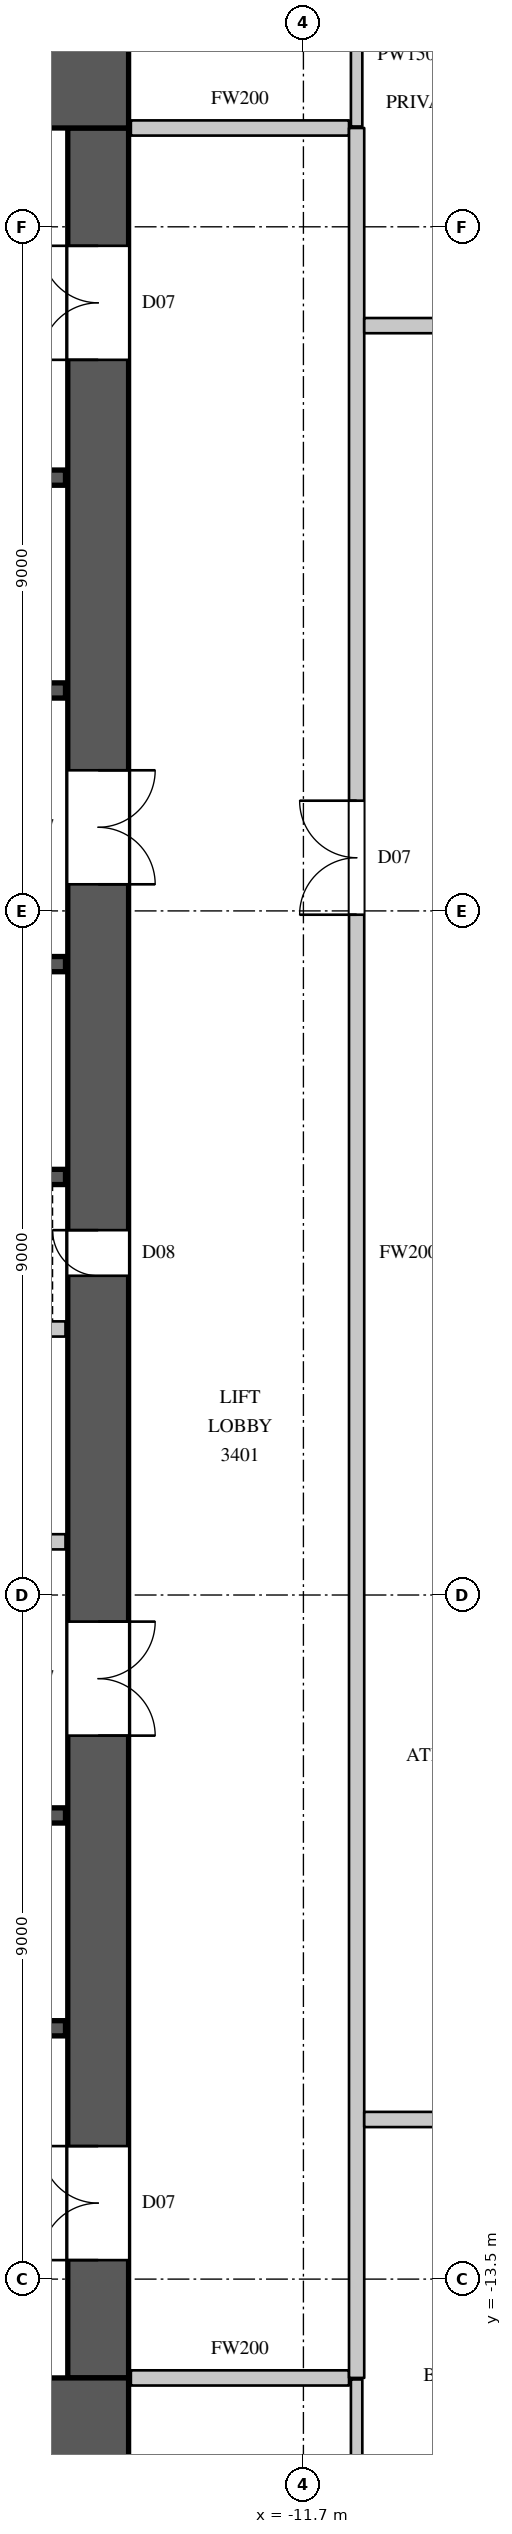
"""IFC4 building model, lengths in metres.
Left out: names, types, materials, properties, quantities, classifications, styles, units other than length and angle.
Written with IfcOpenShell. Run it as: python <this file> out.ifc"""

import sys

from ifc_helpers import new_model, si_unit, direction, frame, frame_2d, origin, place, context, subcontext, project, spatial, rectangle, extrude, element, fill, save


model = new_model("IFC4")
c1 = context("Model", 3, precision=1e-05, world=origin(), true_north=direction((0.0, 1.0)))
c2 = subcontext(c1, "Body", "Model", "MODEL_VIEW")
j1 = project(units=[si_unit("LENGTHUNIT", "METRE"), si_unit("PLANEANGLEUNIT", "RADIAN")], contexts=[c1])
p1 = place(None, origin())
s1 = spatial("IfcSite", under=j1, at=p1, CompositionType="ELEMENT")
p2 = place(p1, origin())
s2 = spatial("IfcBuilding", under=s1, at=p2, CompositionType="ELEMENT")
p3 = place(p2, frame((0.0, 0.0, 160.5)))
s3 = spatial("IfcBuildingStorey", under=s2, at=p3, CompositionType="ELEMENT", Elevation=160.5)
for number, where, z_axis, x_axis in (
    (1, (-30.0, 15.4, 0.0), (0.0, 0.0, 1.0), (1.0, 0.0, 0.0)),
    (2, (-30.0, -15.4, 0.0), (0.0, 0.0, 1.0), (1.0, 0.0, 0.0)),
):
    element("IfcWall", number, at=place(p3, frame(where, z_axis=z_axis, x_axis=x_axis)), inside=s3, PredefinedType="SHEAR", context=c2, shape_type="SweptSolid", body=[
        extrude(rectangle(XDim=16.0, YDim=1.2, at=frame_2d((8.0, 0.0))), origin(), (0.0, 0.0, 1.0), 4.1),
    ])
p4 = place(p3, frame((-14.4, -14.8, 0.0), z_axis=(0.0, 0.0, 1.0), x_axis=(0.0, 1.0, 0.0)))
e3 = element("IfcWall", 3, at=p4, inside=s3, PredefinedType="SHEAR", context=c2, shape_type="SweptSolid", body=[
    extrude(rectangle(XDim=29.6, YDim=0.8, at=frame_2d((14.8, 0.0))), origin(), (0.0, 0.0, 1.0), 4.1),
])
p5 = place(p4, frame((1.55, 0.0, 0.0)))
e4 = element("IfcOpeningElement", 4, at=p5, cuts=e3, PredefinedType="OPENING", context=c2, shape_type="SweptSolid", body=[
    extrude(rectangle(XDim=1.5, YDim=2.4, at=frame_2d((0.75, 1.2))), frame((0.0, 0.41, 0.0), z_axis=(0.0, -1.0, 0.0), x_axis=(1.0, 0.0, 0.0)), (0.0, 0.0, 1.0), 0.82),
])
p6 = place(p4, frame((26.55, 0.0, 0.0)))
e5 = element("IfcOpeningElement", 5, at=p6, cuts=e3, PredefinedType="OPENING", context=c2, shape_type="SweptSolid", body=[
    extrude(rectangle(XDim=1.5, YDim=2.4, at=frame_2d((0.75, 1.2))), frame((0.0, 0.41, 0.0), z_axis=(0.0, -1.0, 0.0), x_axis=(1.0, 0.0, 0.0)), (0.0, 0.0, 1.0), 0.82),
])
p7 = place(p4, frame((8.45, 0.0, 0.0)))
e6 = element("IfcOpeningElement", 6, at=p7, cuts=e3, PredefinedType="OPENING", context=c2, shape_type="SweptSolid", body=[
    extrude(rectangle(XDim=1.5, YDim=2.4, at=frame_2d((0.75, 1.2))), frame((0.0, 0.41, 0.0), z_axis=(0.0, -1.0, 0.0), x_axis=(1.0, 0.0, 0.0)), (0.0, 0.0, 1.0), 0.82),
])
p8 = place(p4, frame((19.65, 0.0, 0.0)))
e7 = element("IfcOpeningElement", 7, at=p8, cuts=e3, PredefinedType="OPENING", context=c2, shape_type="SweptSolid", body=[
    extrude(rectangle(XDim=1.5, YDim=2.4, at=frame_2d((0.75, 1.2))), frame((0.0, 0.41, 0.0), z_axis=(0.0, -1.0, 0.0), x_axis=(1.0, 0.0, 0.0)), (0.0, 0.0, 1.0), 0.82),
])
p9 = place(p4, frame((14.5, 0.0, 0.0)))
e8 = element("IfcOpeningElement", 8, at=p9, cuts=e3, PredefinedType="OPENING", context=c2, shape_type="SweptSolid", body=[
    extrude(rectangle(XDim=0.6, YDim=2.0, at=frame_2d((0.3, 1.0))), frame((0.0, 0.41, 0.0), z_axis=(0.0, -1.0, 0.0), x_axis=(1.0, 0.0, 0.0)), (0.0, 0.0, 1.0), 0.82),
])
p10 = place(p3, frame((-22.62, -3.8, 0.0), z_axis=(0.0, 0.0, 1.0), x_axis=(1.0, 0.0, 0.0)))
e9 = element("IfcWall", 9, at=p10, inside=s3, PredefinedType="PARTITIONING", context=c2, shape_type="SweptSolid", body=[
    extrude(rectangle(XDim=7.79, YDim=0.2, at=frame_2d((3.895, 0.0))), origin(), (0.0, 0.0, 1.0), 3.8),
])
p11 = place(p10, frame((3.45, 0.0, 0.0)))
e10 = element("IfcOpeningElement", 10, at=p11, cuts=e9, PredefinedType="OPENING", context=c2, shape_type="SweptSolid", body=[
    extrude(rectangle(XDim=0.9, YDim=2.2, at=frame_2d((0.45, 1.1))), frame((0.0, 0.11, 0.0), z_axis=(0.0, -1.0, 0.0), x_axis=(1.0, 0.0, 0.0)), (0.0, 0.0, 1.0), 0.22),
])
for number, where, z_axis, x_axis in (
    (11, (-13.97, -14.8, 0.0), (0.0, 0.0, 1.0), (1.0, 0.0, 0.0)),
    (12, (-13.97, 14.8, 0.0), (0.0, 0.0, 1.0), (1.0, 0.0, 0.0)),
):
    element("IfcWall", number, at=place(p3, frame(where, z_axis=z_axis, x_axis=x_axis)), inside=s3, PredefinedType="PARTITIONING", context=c2, shape_type="SweptSolid", body=[
        extrude(rectangle(XDim=2.87, YDim=0.2, at=frame_2d((1.435, 0.0))), origin(), (0.0, 0.0, 1.0), 3.8),
    ])
p12 = place(p3, frame((-11.0, -14.8, 0.0), z_axis=(0.0, 0.0, 1.0), x_axis=(0.0, 1.0, 0.0)))
e13 = element("IfcWall", 13, at=p12, inside=s3, PredefinedType="PARTITIONING", context=c2, shape_type="SweptSolid", body=[
    extrude(rectangle(XDim=29.6, YDim=0.2, at=frame_2d((14.8, 0.0))), origin(), (0.0, 0.0, 1.0), 3.8),
])
p13 = place(p12, frame((19.25, 0.0, 0.0)))
e14 = element("IfcOpeningElement", 14, at=p13, cuts=e13, PredefinedType="OPENING", context=c2, shape_type="SweptSolid", body=[
    extrude(rectangle(XDim=1.5, YDim=2.4, at=frame_2d((0.75, 1.2))), frame((0.0, 0.11, 0.0), z_axis=(0.0, -1.0, 0.0), x_axis=(1.0, 0.0, 0.0)), (0.0, 0.0, 1.0), 0.22),
])
p14 = place(p3, frame((-10.9, -11.4, 0.0), z_axis=(0.0, 0.0, 1.0), x_axis=(1.0, 0.0, 0.0)))
e15 = element("IfcWall", 15, at=p14, inside=s3, PredefinedType="PARTITIONING", context=c2, shape_type="SweptSolid", body=[
    extrude(rectangle(XDim=21.2, YDim=0.2, at=frame_2d((10.6, 0.0))), origin(), (0.0, 0.0, 1.0), 3.8),
])
p15 = place(p14, frame((0.95, 0.0, 0.0)))
e16 = element("IfcOpeningElement", 16, at=p15, cuts=e15, PredefinedType="OPENING", context=c2, shape_type="SweptSolid", body=[
    extrude(rectangle(XDim=0.95, YDim=2.2, at=frame_2d((0.475, 1.1))), frame((0.0, 0.11, 0.0), z_axis=(0.0, -1.0, 0.0), x_axis=(1.0, 0.0, 0.0)), (0.0, 0.0, 1.0), 0.22),
])
p16 = place(p14, frame((4.2, 0.0, 0.0)))
e17 = element("IfcOpeningElement", 17, at=p16, cuts=e15, PredefinedType="OPENING", context=c2, shape_type="SweptSolid", body=[
    extrude(rectangle(XDim=0.95, YDim=2.2, at=frame_2d((0.475, 1.1))), frame((0.0, 0.11, 0.0), z_axis=(0.0, -1.0, 0.0), x_axis=(1.0, 0.0, 0.0)), (0.0, 0.0, 1.0), 0.22),
])
p17 = place(p14, frame((7.1, 0.0, 0.0)))
e18 = element("IfcOpeningElement", 18, at=p17, cuts=e15, PredefinedType="OPENING", context=c2, shape_type="SweptSolid", body=[
    extrude(rectangle(XDim=0.9, YDim=2.2, at=frame_2d((0.45, 1.1))), frame((0.0, 0.11, 0.0), z_axis=(0.0, -1.0, 0.0), x_axis=(1.0, 0.0, 0.0)), (0.0, 0.0, 1.0), 0.22),
])
p18 = place(p14, frame((10.0, 0.0, 0.0)))
e19 = element("IfcOpeningElement", 19, at=p18, cuts=e15, PredefinedType="OPENING", context=c2, shape_type="SweptSolid", body=[
    extrude(rectangle(XDim=0.9, YDim=2.2, at=frame_2d((0.45, 1.1))), frame((0.0, 0.11, 0.0), z_axis=(0.0, -1.0, 0.0), x_axis=(1.0, 0.0, 0.0)), (0.0, 0.0, 1.0), 0.22),
])
p19 = place(p14, frame((13.55, 0.0, 0.0)))
e20 = element("IfcOpeningElement", 20, at=p19, cuts=e15, PredefinedType="OPENING", context=c2, shape_type="SweptSolid", body=[
    extrude(rectangle(XDim=0.9, YDim=2.2, at=frame_2d((0.45, 1.1))), frame((0.0, 0.11, 0.0), z_axis=(0.0, -1.0, 0.0), x_axis=(1.0, 0.0, 0.0)), (0.0, 0.0, 1.0), 0.22),
])
p20 = place(p14, frame((17.85, 0.0, 0.0)))
e21 = element("IfcOpeningElement", 21, at=p20, cuts=e15, PredefinedType="OPENING", context=c2, shape_type="SweptSolid", body=[
    extrude(rectangle(XDim=1.1, YDim=2.4, at=frame_2d((0.55, 1.2))), frame((0.0, 0.11, 0.0), z_axis=(0.0, -1.0, 0.0), x_axis=(1.0, 0.0, 0.0)), (0.0, 0.0, 1.0), 0.22),
])
p21 = place(p3, frame((-10.9, 12.2, 0.0), z_axis=(0.0, 0.0, 1.0), x_axis=(1.0, 0.0, 0.0)))
e22 = element("IfcWall", 22, at=p21, inside=s3, PredefinedType="PARTITIONING", context=c2, shape_type="SweptSolid", body=[
    extrude(rectangle(XDim=3.704, YDim=0.2, at=frame_2d((1.852, 0.0))), origin(), (0.0, 0.0, 1.0), 3.8),
])
p22 = place(p21, frame((1.7, 0.0, 0.0)))
e23 = element("IfcOpeningElement", 23, at=p22, cuts=e22, PredefinedType="OPENING", context=c2, shape_type="SweptSolid", body=[
    extrude(rectangle(XDim=1.1, YDim=2.4, at=frame_2d((0.55, 1.2))), frame((0.0, 0.11, 0.0), z_axis=(0.0, -1.0, 0.0), x_axis=(1.0, 0.0, 0.0)), (0.0, 0.0, 1.0), 0.22),
])
for number, where, z_axis, x_axis in (
    (24, (-11.0, -16.7, 0.0), (0.0, 0.0, 1.0), (0.0, 1.0, 0.0)),
    (25, (-11.0, 14.82, 0.0), (0.0, 0.0, 1.0), (0.0, 1.0, 0.0)),
):
    element("IfcWall", number, at=place(p3, frame(where, z_axis=z_axis, x_axis=x_axis)), inside=s3, PredefinedType="PARTITIONING", context=c2, shape_type="SweptSolid", body=[
        extrude(rectangle(XDim=1.88, YDim=0.15, at=frame_2d((0.94, 0.0))), origin(), (0.0, 0.0, 1.0), 3.8),
    ])
p23 = place(p3, frame((-29.17, -1.0, 0.0), z_axis=(0.0, 0.0, 1.0), x_axis=(1.0, 0.0, 0.0)))
e26 = element("IfcWall", 26, at=p23, inside=s3, PredefinedType="PARTITIONING", context=c2, shape_type="SweptSolid", body=[
    extrude(rectangle(XDim=14.34, YDim=0.2, at=frame_2d((7.17, 0.0))), origin(), (0.0, 0.0, 1.0), 3.8),
])
p24 = place(p3, frame((-26.08, 1.0, 0.0), z_axis=(0.0, 0.0, 1.0), x_axis=(1.0, 0.0, 0.0)))
e27 = element("IfcWall", 27, at=p24, inside=s3, PredefinedType="SHEAR", context=c2, shape_type="SweptSolid", body=[
    extrude(rectangle(XDim=11.25, YDim=0.2, at=frame_2d((5.625, 0.0))), origin(), (0.0, 0.0, 1.0), 3.8),
])
p25 = place(p3, frame((-26.08, 3.8, 0.0), z_axis=(0.0, 0.0, 1.0), x_axis=(1.0, 0.0, 0.0)))
e28 = element("IfcWall", 28, at=p25, inside=s3, PredefinedType="SHEAR", context=c2, shape_type="SweptSolid", body=[
    extrude(rectangle(XDim=11.25, YDim=0.2, at=frame_2d((5.625, 0.0))), origin(), (0.0, 0.0, 1.0), 3.8),
])
p26 = place(p25, frame((0.8, 0.0, 0.0)))
e29 = element("IfcOpeningElement", 29, at=p26, cuts=e28, PredefinedType="OPENING", context=c2, shape_type="SweptSolid", body=[
    extrude(rectangle(XDim=1.1, YDim=2.2, at=frame_2d((0.55, 1.1))), frame((0.0, 0.11, 0.0), z_axis=(0.0, -1.0, 0.0), x_axis=(1.0, 0.0, 0.0)), (0.0, 0.0, 1.0), 0.22),
])
p27 = place(p25, frame((3.55, 0.0, 0.0)))
e30 = element("IfcOpeningElement", 30, at=p27, cuts=e28, PredefinedType="OPENING", context=c2, shape_type="SweptSolid", body=[
    extrude(rectangle(XDim=1.1, YDim=2.2, at=frame_2d((0.55, 1.1))), frame((0.0, 0.11, 0.0), z_axis=(0.0, -1.0, 0.0), x_axis=(1.0, 0.0, 0.0)), (0.0, 0.0, 1.0), 0.22),
])
p28 = place(p25, frame((6.25, 0.0, 0.0)))
e31 = element("IfcOpeningElement", 31, at=p28, cuts=e28, PredefinedType="OPENING", context=c2, shape_type="SweptSolid", body=[
    extrude(rectangle(XDim=1.1, YDim=2.2, at=frame_2d((0.55, 1.1))), frame((0.0, 0.11, 0.0), z_axis=(0.0, -1.0, 0.0), x_axis=(1.0, 0.0, 0.0)), (0.0, 0.0, 1.0), 0.22),
])
p29 = place(p25, frame((9.15, 0.0, 0.0)))
e32 = element("IfcOpeningElement", 32, at=p29, cuts=e28, PredefinedType="OPENING", context=c2, shape_type="SweptSolid", body=[
    extrude(rectangle(XDim=1.1, YDim=2.2, at=frame_2d((0.55, 1.1))), frame((0.0, 0.11, 0.0), z_axis=(0.0, -1.0, 0.0), x_axis=(1.0, 0.0, 0.0)), (0.0, 0.0, 1.0), 0.22),
])
p30 = place(p3, frame((-17.92, -10.2, 0.0), z_axis=(0.0, 0.0, 1.0), x_axis=(1.0, 0.0, 0.0)))
e33 = element("IfcWall", 33, at=p30, inside=s3, PredefinedType="SHEAR", context=c2, shape_type="SweptSolid", body=[
    extrude(rectangle(XDim=3.09, YDim=0.2, at=frame_2d((1.545, 0.0))), origin(), (0.0, 0.0, 1.0), 3.8),
])
p31 = place(p30, frame((1.0, 0.0, 0.0)))
e34 = element("IfcOpeningElement", 34, at=p31, cuts=e33, PredefinedType="OPENING", context=c2, shape_type="SweptSolid", body=[
    extrude(rectangle(XDim=1.1, YDim=2.2, at=frame_2d((0.55, 1.1))), frame((0.0, 0.11, 0.0), z_axis=(0.0, -1.0, 0.0), x_axis=(1.0, 0.0, 0.0)), (0.0, 0.0, 1.0), 0.22),
])
p32 = place(p3, frame((-17.9, -7.4, 0.0), z_axis=(0.0, 0.0, 1.0), x_axis=(1.0, 0.0, 0.0)))
e35 = element("IfcWall", 35, at=p32, inside=s3, PredefinedType="SHEAR", context=c2, shape_type="SweptSolid", body=[
    extrude(rectangle(XDim=3.07, YDim=0.2, at=frame_2d((1.535, 0.0))), origin(), (0.0, 0.0, 1.0), 3.8),
])
p33 = place(p3, frame((-17.92, 7.4, 0.0), z_axis=(0.0, 0.0, 1.0), x_axis=(1.0, 0.0, 0.0)))
e36 = element("IfcWall", 36, at=p33, inside=s3, PredefinedType="SHEAR", context=c2, shape_type="SweptSolid", body=[
    extrude(rectangle(XDim=3.09, YDim=0.2, at=frame_2d((1.545, 0.0))), origin(), (0.0, 0.0, 1.0), 3.8),
])
p34 = place(p3, frame((-17.92, 10.2, 0.0), z_axis=(0.0, 0.0, 1.0), x_axis=(1.0, 0.0, 0.0)))
e37 = element("IfcWall", 37, at=p34, inside=s3, PredefinedType="SHEAR", context=c2, shape_type="SweptSolid", body=[
    extrude(rectangle(XDim=3.09, YDim=0.2, at=frame_2d((1.545, 0.0))), origin(), (0.0, 0.0, 1.0), 3.8),
])
p35 = place(p34, frame((1.0, 0.0, 0.0)))
e38 = element("IfcOpeningElement", 38, at=p35, cuts=e37, PredefinedType="OPENING", context=c2, shape_type="SweptSolid", body=[
    extrude(rectangle(XDim=1.1, YDim=2.2, at=frame_2d((0.55, 1.1))), frame((0.0, 0.11, 0.0), z_axis=(0.0, -1.0, 0.0), x_axis=(1.0, 0.0, 0.0)), (0.0, 0.0, 1.0), 0.22),
])
p36 = place(p13, origin())
e39 = element("IfcDoor", 39, at=p36, inside=s3, OperationType="DOUBLE_DOOR_SINGLE_SWING", PredefinedType="DOOR", context=c2, shape_type="SweptSolid", body=[
    extrude(rectangle(XDim=1.5, YDim=2.4, at=frame_2d((0.75, 1.2))), frame((0.0, 0.025, 0.0), z_axis=(0.0, -1.0, 0.0), x_axis=(1.0, 0.0, 0.0)), (0.0, 0.0, 1.0), 0.05),
])
fill(e14, e39)
p37 = place(p5, origin())
e40 = element("IfcDoor", 40, at=p37, inside=s3, OperationType="DOUBLE_DOOR_SINGLE_SWING", PredefinedType="DOOR", context=c2, shape_type="SweptSolid", body=[
    extrude(rectangle(XDim=1.5, YDim=2.4, at=frame_2d((0.75, 1.2))), frame((0.0, 0.395, 0.0), z_axis=(0.0, -1.0, 0.0), x_axis=(1.0, 0.0, 0.0)), (0.0, 0.0, 1.0), 0.05),
])
fill(e4, e40)
p38 = place(p6, origin())
e41 = element("IfcDoor", 41, at=p38, inside=s3, OperationType="DOUBLE_DOOR_SINGLE_SWING", PredefinedType="DOOR", context=c2, shape_type="SweptSolid", body=[
    extrude(rectangle(XDim=1.5, YDim=2.4, at=frame_2d((0.75, 1.2))), frame((0.0, 0.395, 0.0), z_axis=(0.0, -1.0, 0.0), x_axis=(1.0, 0.0, 0.0)), (0.0, 0.0, 1.0), 0.05),
])
fill(e5, e41)
p39 = place(p7, origin())
e42 = element("IfcDoor", 42, at=p39, inside=s3, OperationType="DOUBLE_DOOR_SINGLE_SWING", PredefinedType="DOOR", context=c2, shape_type="SweptSolid", body=[
    extrude(rectangle(XDim=1.5, YDim=2.4, at=frame_2d((0.75, 1.2))), frame((0.0, -0.345, 0.0), z_axis=(0.0, -1.0, 0.0), x_axis=(1.0, 0.0, 0.0)), (0.0, 0.0, 1.0), 0.05),
])
fill(e6, e42)
p40 = place(p8, origin())
e43 = element("IfcDoor", 43, at=p40, inside=s3, OperationType="DOUBLE_DOOR_SINGLE_SWING", PredefinedType="DOOR", context=c2, shape_type="SweptSolid", body=[
    extrude(rectangle(XDim=1.5, YDim=2.4, at=frame_2d((0.75, 1.2))), frame((0.0, -0.345, 0.0), z_axis=(0.0, -1.0, 0.0), x_axis=(1.0, 0.0, 0.0)), (0.0, 0.0, 1.0), 0.05),
])
fill(e7, e43)
p41 = place(p9, origin())
e44 = element("IfcDoor", 44, at=p41, inside=s3, OperationType="SINGLE_SWING_RIGHT", PredefinedType="DOOR", context=c2, shape_type="SweptSolid", body=[
    extrude(rectangle(XDim=0.6, YDim=2.0, at=frame_2d((0.3, 1.0))), frame((0.0, 0.395, 0.0), z_axis=(0.0, -1.0, 0.0), x_axis=(1.0, 0.0, 0.0)), (0.0, 0.0, 1.0), 0.05),
])
fill(e8, e44)
save(model, sys.argv[1])
